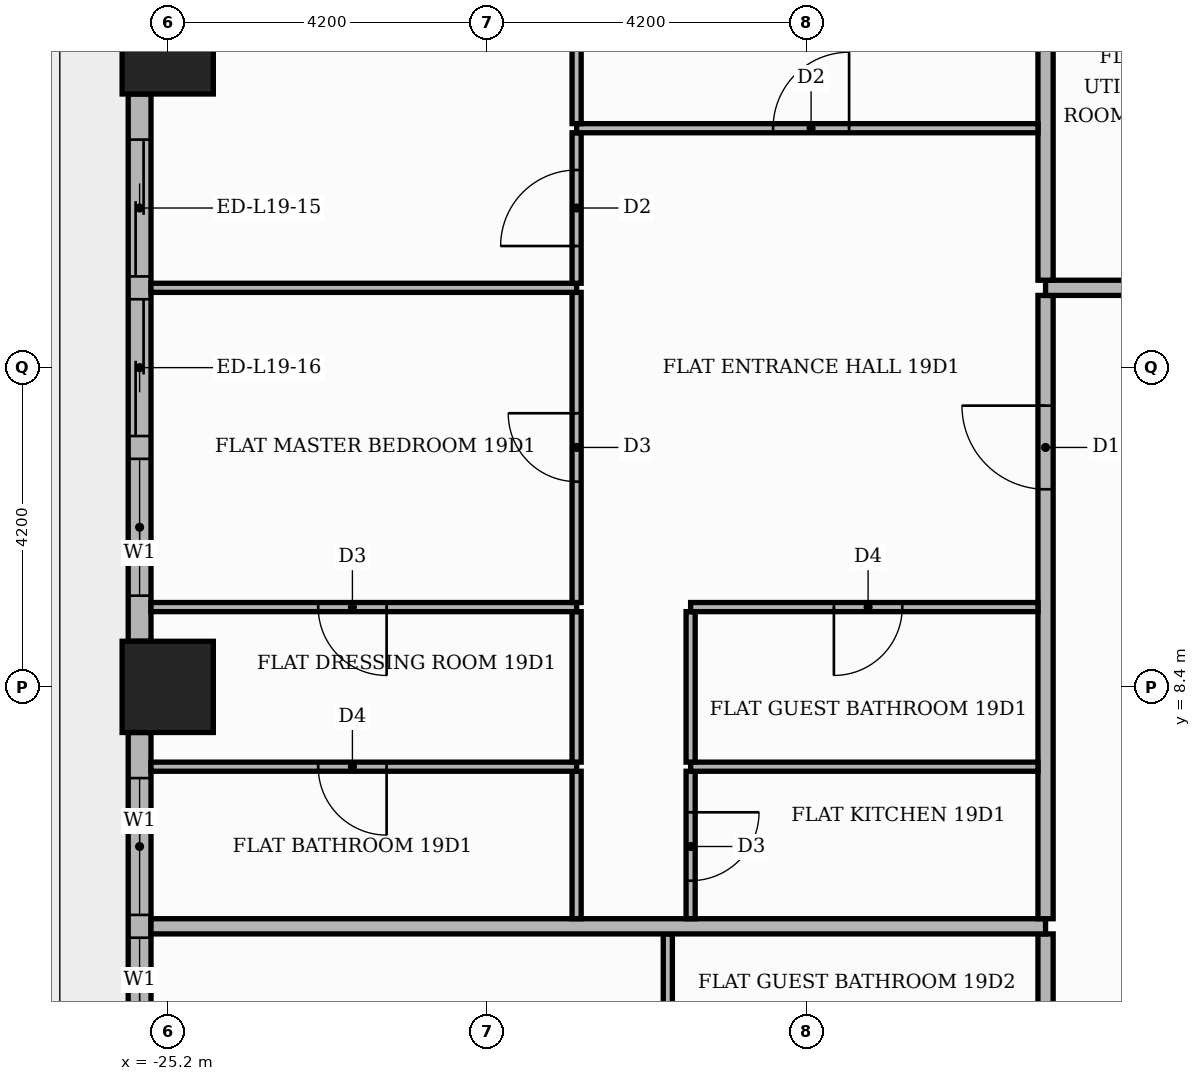
"""IFC4 building model, lengths in metres.
Left out: names, types, materials, properties, quantities, classifications, styles, units other than length and angle.
Written with IfcOpenShell. Run it as: python <this file> out.ifc"""

import sys

from ifc_helpers import new_model, si_unit, direction, frame, frame_2d, origin, origin_2d, place, context, subcontext, project, spatial, rectangle, extrude, element, fill, save


model = new_model("IFC4")
c1 = context("Model", 3, precision=1e-05, world=origin(), true_north=direction((0.0, 1.0)))
c2 = subcontext(c1, "Body", "Model", "MODEL_VIEW")
j1 = project(units=[si_unit("LENGTHUNIT", "METRE"), si_unit("PLANEANGLEUNIT", "RADIAN")], contexts=[c1])
p1 = place(None, origin())
s1 = spatial("IfcSite", under=j1, at=p1, CompositionType="ELEMENT")
p2 = place(p1, origin())
s2 = spatial("IfcBuilding", under=s1, at=p2, CompositionType="ELEMENT")
p3 = place(p2, frame((0.0, 0.0, 83.1)))
s3 = spatial("IfcBuildingStorey", under=s2, at=p3, CompositionType="ELEMENT", Elevation=83.1)
for number, where, z_axis, x_axis in (
    (1, (-25.2, 8.4, 0.0), (0.0, 0.0, 1.0), (1.0, 0.0, 0.0)),
    (2, (-25.2, 16.8, 0.0), (0.0, 0.0, 1.0), (1.0, 0.0, 0.0)),
):
    element("IfcColumn", number, at=place(p3, frame(where, z_axis=z_axis, x_axis=x_axis)), inside=s3, PredefinedType="COLUMN", context=c2, shape_type="SweptSolid", body=[
        extrude(rectangle(XDim=1.2, YDim=1.2, at=origin_2d()), origin(), (0.0, 0.0, 1.0), 3.9),
    ])
p4 = place(p3, frame((-25.57, 16.2, 0.0), z_axis=(0.0, 0.0, 1.0), x_axis=(0.0, -1.0, 0.0)))
e3 = element("IfcWall", 3, at=p4, inside=s3, PredefinedType="STANDARD", context=c2, shape_type="SweptSolid", body=[
    extrude(rectangle(XDim=7.2, YDim=0.3, at=frame_2d((3.6, 0.0))), origin(), (0.0, 0.0, 1.0), 3.48),
])
p5 = place(p4, frame((0.6, 0.0, 0.0)))
e4 = element("IfcOpeningElement", 4, at=p5, cuts=e3, PredefinedType="OPENING", context=c2, shape_type="SweptSolid", body=[
    extrude(rectangle(XDim=1.8, YDim=2.4, at=frame_2d((0.9, 1.2))), frame((0.0, 0.16, 0.0), z_axis=(0.0, -1.0, 0.0), x_axis=(1.0, 0.0, 0.0)), (0.0, 0.0, 1.0), 0.32),
])
p6 = place(p4, frame((2.7, 0.0, 0.0)))
e5 = element("IfcOpeningElement", 5, at=p6, cuts=e3, PredefinedType="OPENING", context=c2, shape_type="SweptSolid", body=[
    extrude(rectangle(XDim=1.8, YDim=2.4, at=frame_2d((0.9, 1.2))), frame((0.0, 0.16, 0.0), z_axis=(0.0, -1.0, 0.0), x_axis=(1.0, 0.0, 0.0)), (0.0, 0.0, 1.0), 0.32),
])
p7 = place(p4, frame((4.8, 0.0, 0.9)))
e6 = element("IfcOpeningElement", 6, at=p7, cuts=e3, PredefinedType="OPENING", context=c2, shape_type="SweptSolid", body=[
    extrude(rectangle(XDim=1.8, YDim=2.1, at=frame_2d((0.9, 1.05))), frame((0.0, 0.16, 0.0), z_axis=(0.0, -1.0, 0.0), x_axis=(1.0, 0.0, 0.0)), (0.0, 0.0, 1.0), 0.32),
])
p8 = place(p3, frame((-25.57, 7.8, 0.0), z_axis=(0.0, 0.0, 1.0), x_axis=(0.0, -1.0, 0.0)))
e7 = element("IfcWall", 7, at=p8, inside=s3, PredefinedType="STANDARD", context=c2, shape_type="SweptSolid", body=[
    extrude(rectangle(XDim=4.65, YDim=0.3, at=frame_2d((2.325, 0.0))), origin(), (0.0, 0.0, 1.0), 3.48),
])
p9 = place(p8, frame((0.6, 0.0, 0.9)))
e8 = element("IfcOpeningElement", 8, at=p9, cuts=e7, PredefinedType="OPENING", context=c2, shape_type="SweptSolid", body=[
    extrude(rectangle(XDim=1.8, YDim=2.1, at=frame_2d((0.9, 1.05))), frame((0.0, 0.16, 0.0), z_axis=(0.0, -1.0, 0.0), x_axis=(1.0, 0.0, 0.0)), (0.0, 0.0, 1.0), 0.32),
])
p10 = place(p8, frame((2.7, 0.0, 0.9)))
e9 = element("IfcOpeningElement", 9, at=p10, cuts=e7, PredefinedType="OPENING", context=c2, shape_type="SweptSolid", body=[
    extrude(rectangle(XDim=1.8, YDim=2.1, at=frame_2d((0.9, 1.05))), frame((0.0, 0.16, 0.0), z_axis=(0.0, -1.0, 0.0), x_axis=(1.0, 0.0, 0.0)), (0.0, 0.0, 1.0), 0.32),
])
p11 = place(p3, frame((-13.65, -13.55, 0.0), z_axis=(0.0, 0.0, 1.0), x_axis=(0.0, 1.0, 0.0)))
e10 = element("IfcWall", 10, at=p11, inside=s3, PredefinedType="PARTITIONING", context=c2, shape_type="SweptSolid", body=[
    extrude(rectangle(XDim=18.7, YDim=0.2, at=frame_2d((9.35, 0.0))), origin(), (0.0, 0.0, 1.0), 3.48),
])
p12 = place(p11, frame((14.05, 0.0, 0.0)))
e11 = element("IfcOpeningElement", 11, at=p12, cuts=e10, PredefinedType="OPENING", context=c2, shape_type="SweptSolid", body=[
    extrude(rectangle(XDim=1.1, YDim=2.4, at=frame_2d((0.55, 1.2))), frame((0.0, 0.11, 0.0), z_axis=(0.0, -1.0, 0.0), x_axis=(1.0, 0.0, 0.0)), (0.0, 0.0, 1.0), 0.22),
])
p13 = place(p3, frame((-18.62, 3.21, 0.0), z_axis=(0.0, 0.0, 1.0), x_axis=(0.0, 1.0, 0.0)))
e12 = element("IfcWall", 12, at=p13, inside=s3, PredefinedType="PARTITIONING", context=c2, shape_type="SweptSolid", body=[
    extrude(rectangle(XDim=1.94, YDim=0.12, at=frame_2d((0.97, 0.0))), origin(), (0.0, 0.0, 1.0), 3.48),
])
p14 = place(p3, frame((-25.42, 5.25, 0.0), z_axis=(0.0, 0.0, 1.0), x_axis=(1.0, 0.0, 0.0)))
e13 = element("IfcWall", 13, at=p14, inside=s3, PredefinedType="PARTITIONING", context=c2, shape_type="SweptSolid", body=[
    extrude(rectangle(XDim=11.77, YDim=0.2, at=frame_2d((5.885, 0.0))), origin(), (0.0, 0.0, 1.0), 3.48),
])
p15 = place(p3, frame((-19.82, 5.35, 0.0), z_axis=(0.0, 0.0, 1.0), x_axis=(0.0, 1.0, 0.0)))
e14 = element("IfcWall", 14, at=p15, inside=s3, PredefinedType="PARTITIONING", context=c2, shape_type="SweptSolid", body=[
    extrude(rectangle(XDim=1.94, YDim=0.12, at=frame_2d((0.97, 0.0))), origin(), (0.0, 0.0, 1.0), 3.48),
])
p16 = place(p3, frame((-18.32, 5.35, 0.0), z_axis=(0.0, 0.0, 1.0), x_axis=(0.0, 1.0, 0.0)))
e15 = element("IfcWall", 15, at=p16, inside=s3, PredefinedType="PARTITIONING", context=c2, shape_type="SweptSolid", body=[
    extrude(rectangle(XDim=1.94, YDim=0.12, at=frame_2d((0.97, 0.0))), origin(), (0.0, 0.0, 1.0), 3.48),
])
p17 = place(p16, frame((0.5, 0.0, 0.0)))
e16 = element("IfcOpeningElement", 16, at=p17, cuts=e15, PredefinedType="OPENING", context=c2, shape_type="SweptSolid", body=[
    extrude(rectangle(XDim=0.9, YDim=2.1, at=frame_2d((0.45, 1.05))), frame((0.0, 0.07, 0.0), z_axis=(0.0, -1.0, 0.0), x_axis=(1.0, 0.0, 0.0)), (0.0, 0.0, 1.0), 0.14),
])
p18 = place(p3, frame((-13.65, 5.35, 0.0), z_axis=(0.0, 0.0, 1.0), x_axis=(0.0, 1.0, 0.0)))
e17 = element("IfcWall", 17, at=p18, inside=s3, PredefinedType="PARTITIONING", context=c2, shape_type="SweptSolid", body=[
    extrude(rectangle(XDim=8.2, YDim=0.2, at=frame_2d((4.1, 0.0))), origin(), (0.0, 0.0, 1.0), 3.48),
])
p19 = place(p18, frame((5.65, 0.0, 0.0)))
e18 = element("IfcOpeningElement", 18, at=p19, cuts=e17, PredefinedType="OPENING", context=c2, shape_type="SweptSolid", body=[
    extrude(rectangle(XDim=1.1, YDim=2.4, at=frame_2d((0.55, 1.2))), frame((0.0, 0.11, 0.0), z_axis=(0.0, -1.0, 0.0), x_axis=(1.0, 0.0, 0.0)), (0.0, 0.0, 1.0), 0.22),
])
p20 = place(p3, frame((-25.42, 7.35, 0.0), z_axis=(0.0, 0.0, 1.0), x_axis=(1.0, 0.0, 0.0)))
e19 = element("IfcWall", 19, at=p20, inside=s3, PredefinedType="PARTITIONING", context=c2, shape_type="SweptSolid", body=[
    extrude(rectangle(XDim=5.6, YDim=0.12, at=frame_2d((2.8, 0.0))), origin(), (0.0, 0.0, 1.0), 3.48),
])
p21 = place(p20, frame((2.2, 0.0, 0.0)))
e20 = element("IfcOpeningElement", 20, at=p21, cuts=e19, PredefinedType="OPENING", context=c2, shape_type="SweptSolid", body=[
    extrude(rectangle(XDim=0.9, YDim=2.1, at=frame_2d((0.45, 1.05))), frame((0.0, 0.07, 0.0), z_axis=(0.0, -1.0, 0.0), x_axis=(1.0, 0.0, 0.0)), (0.0, 0.0, 1.0), 0.14),
])
p22 = place(p3, frame((-18.32, 7.35, 0.0), z_axis=(0.0, 0.0, 1.0), x_axis=(1.0, 0.0, 0.0)))
e21 = element("IfcWall", 21, at=p22, inside=s3, PredefinedType="PARTITIONING", context=c2, shape_type="SweptSolid", body=[
    extrude(rectangle(XDim=4.57, YDim=0.12, at=frame_2d((2.285, 0.0))), origin(), (0.0, 0.0, 1.0), 3.48),
])
for number, where, z_axis, x_axis in (
    (22, (-19.82, 7.41, 0.0), (0.0, 0.0, 1.0), (0.0, 1.0, 0.0)),
    (23, (-18.32, 7.41, 0.0), (0.0, 0.0, 1.0), (0.0, 1.0, 0.0)),
):
    element("IfcWall", number, at=place(p3, frame(where, z_axis=z_axis, x_axis=x_axis)), inside=s3, PredefinedType="PARTITIONING", context=c2, shape_type="SweptSolid", body=[
        extrude(rectangle(XDim=1.98, YDim=0.12, at=frame_2d((0.99, 0.0))), origin(), (0.0, 0.0, 1.0), 3.48),
    ])
p23 = place(p3, frame((-25.42, 9.45, 0.0), z_axis=(0.0, 0.0, 1.0), x_axis=(1.0, 0.0, 0.0)))
e24 = element("IfcWall", 24, at=p23, inside=s3, PredefinedType="PARTITIONING", context=c2, shape_type="SweptSolid", body=[
    extrude(rectangle(XDim=5.6, YDim=0.12, at=frame_2d((2.8, 0.0))), origin(), (0.0, 0.0, 1.0), 3.48),
])
p24 = place(p23, frame((2.2, 0.0, 0.0)))
e25 = element("IfcOpeningElement", 25, at=p24, cuts=e24, PredefinedType="OPENING", context=c2, shape_type="SweptSolid", body=[
    extrude(rectangle(XDim=0.9, YDim=2.1, at=frame_2d((0.45, 1.05))), frame((0.0, 0.07, 0.0), z_axis=(0.0, -1.0, 0.0), x_axis=(1.0, 0.0, 0.0)), (0.0, 0.0, 1.0), 0.14),
])
p25 = place(p3, frame((-18.32, 9.45, 0.0), z_axis=(0.0, 0.0, 1.0), x_axis=(1.0, 0.0, 0.0)))
e26 = element("IfcWall", 26, at=p25, inside=s3, PredefinedType="PARTITIONING", context=c2, shape_type="SweptSolid", body=[
    extrude(rectangle(XDim=4.57, YDim=0.12, at=frame_2d((2.285, 0.0))), origin(), (0.0, 0.0, 1.0), 3.48),
])
p26 = place(p25, frame((1.885, 0.0, 0.0)))
e27 = element("IfcOpeningElement", 27, at=p26, cuts=e26, PredefinedType="OPENING", context=c2, shape_type="SweptSolid", body=[
    extrude(rectangle(XDim=0.9, YDim=2.1, at=frame_2d((0.45, 1.05))), frame((0.0, 0.07, 0.0), z_axis=(0.0, -1.0, 0.0), x_axis=(1.0, 0.0, 0.0)), (0.0, 0.0, 1.0), 0.14),
])
p27 = place(p3, frame((-19.82, 9.51, 0.0), z_axis=(0.0, 0.0, 1.0), x_axis=(0.0, 1.0, 0.0)))
e28 = element("IfcWall", 28, at=p27, inside=s3, PredefinedType="PARTITIONING", context=c2, shape_type="SweptSolid", body=[
    extrude(rectangle(XDim=4.08, YDim=0.12, at=frame_2d((2.04, 0.0))), origin(), (0.0, 0.0, 1.0), 3.48),
])
p28 = place(p27, frame((1.59, 0.0, 0.0)))
e29 = element("IfcOpeningElement", 29, at=p28, cuts=e28, PredefinedType="OPENING", context=c2, shape_type="SweptSolid", body=[
    extrude(rectangle(XDim=0.9, YDim=2.1, at=frame_2d((0.45, 1.05))), frame((0.0, 0.07, 0.0), z_axis=(0.0, -1.0, 0.0), x_axis=(1.0, 0.0, 0.0)), (0.0, 0.0, 1.0), 0.14),
])
p29 = place(p3, frame((-25.42, 13.65, 0.0), z_axis=(0.0, 0.0, 1.0), x_axis=(1.0, 0.0, 0.0)))
e30 = element("IfcWall", 30, at=p29, inside=s3, PredefinedType="PARTITIONING", context=c2, shape_type="SweptSolid", body=[
    extrude(rectangle(XDim=5.6, YDim=0.12, at=frame_2d((2.8, 0.0))), origin(), (0.0, 0.0, 1.0), 3.48),
])
p30 = place(p3, frame((-13.65, 13.65, 0.0), z_axis=(0.0, 0.0, 1.0), x_axis=(1.0, 0.0, 0.0)))
e31 = element("IfcWall", 31, at=p30, inside=s3, PredefinedType="PARTITIONING", context=c2, shape_type="SweptSolid", body=[
    extrude(rectangle(XDim=39.07, YDim=0.2, at=frame_2d((19.535, 0.0))), origin(), (0.0, 0.0, 1.0), 3.48),
])
p31 = place(p30, frame((24.65, 0.0, 0.0)))
e32 = element("IfcOpeningElement", 32, at=p31, cuts=e31, PredefinedType="OPENING", context=c2, shape_type="SweptSolid", body=[
    extrude(rectangle(XDim=1.1, YDim=2.4, at=frame_2d((0.55, 1.2))), frame((0.0, 0.11, 0.0), z_axis=(0.0, -1.0, 0.0), x_axis=(1.0, 0.0, 0.0)), (0.0, 0.0, 1.0), 0.22),
])
p32 = place(p30, frame((16.25, 0.0, 0.0)))
e33 = element("IfcOpeningElement", 33, at=p32, cuts=e31, PredefinedType="OPENING", context=c2, shape_type="SweptSolid", body=[
    extrude(rectangle(XDim=1.1, YDim=2.4, at=frame_2d((0.55, 1.2))), frame((0.0, 0.11, 0.0), z_axis=(0.0, -1.0, 0.0), x_axis=(1.0, 0.0, 0.0)), (0.0, 0.0, 1.0), 0.22),
])
p33 = place(p3, frame((-19.82, 13.71, 0.0), z_axis=(0.0, 0.0, 1.0), x_axis=(0.0, 1.0, 0.0)))
e34 = element("IfcWall", 34, at=p33, inside=s3, PredefinedType="PARTITIONING", context=c2, shape_type="SweptSolid", body=[
    extrude(rectangle(XDim=1.98, YDim=0.12, at=frame_2d((0.99, 0.0))), origin(), (0.0, 0.0, 1.0), 3.48),
])
p34 = place(p33, frame((0.49, 0.0, 0.0)))
e35 = element("IfcOpeningElement", 35, at=p34, cuts=e34, PredefinedType="OPENING", context=c2, shape_type="SweptSolid", body=[
    extrude(rectangle(XDim=1.0, YDim=2.1, at=frame_2d((0.5, 1.05))), frame((0.0, 0.07, 0.0), z_axis=(0.0, -1.0, 0.0), x_axis=(1.0, 0.0, 0.0)), (0.0, 0.0, 1.0), 0.14),
])
p35 = place(p3, frame((-13.65, 13.75, 0.0), z_axis=(0.0, 0.0, 1.0), x_axis=(0.0, 1.0, 0.0)))
e36 = element("IfcWall", 36, at=p35, inside=s3, PredefinedType="PARTITIONING", context=c2, shape_type="SweptSolid", body=[
    extrude(rectangle(XDim=11.67, YDim=0.2, at=frame_2d((5.835, 0.0))), origin(), (0.0, 0.0, 1.0), 3.48),
])
p36 = place(p3, frame((-19.82, 15.75, 0.0), z_axis=(0.0, 0.0, 1.0), x_axis=(1.0, 0.0, 0.0)))
e37 = element("IfcWall", 37, at=p36, inside=s3, PredefinedType="PARTITIONING", context=c2, shape_type="SweptSolid", body=[
    extrude(rectangle(XDim=6.07, YDim=0.12, at=frame_2d((3.035, 0.0))), origin(), (0.0, 0.0, 1.0), 3.48),
])
p37 = place(p36, frame((2.585, 0.0, 0.0)))
e38 = element("IfcOpeningElement", 38, at=p37, cuts=e37, PredefinedType="OPENING", context=c2, shape_type="SweptSolid", body=[
    extrude(rectangle(XDim=1.0, YDim=2.1, at=frame_2d((0.5, 1.05))), frame((0.0, 0.07, 0.0), z_axis=(0.0, -1.0, 0.0), x_axis=(1.0, 0.0, 0.0)), (0.0, 0.0, 1.0), 0.14),
])
p38 = place(p3, frame((-19.82, 15.81, 0.0), z_axis=(0.0, 0.0, 1.0), x_axis=(0.0, 1.0, 0.0)))
e39 = element("IfcWall", 39, at=p38, inside=s3, PredefinedType="PARTITIONING", context=c2, shape_type="SweptSolid", body=[
    extrude(rectangle(XDim=1.59, YDim=0.12, at=frame_2d((0.795, 0.0))), origin(), (0.0, 0.0, 1.0), 3.48),
])
p39 = place(p5, origin())
e40 = element("IfcDoor", 40, at=p39, inside=s3, OperationType="SLIDING_TO_LEFT", PredefinedType="DOOR", context=c2, shape_type="SweptSolid", body=[
    extrude(rectangle(XDim=1.8, YDim=2.4, at=frame_2d((0.9, 1.2))), frame((0.0, 0.025, 0.0), z_axis=(0.0, -1.0, 0.0), x_axis=(1.0, 0.0, 0.0)), (0.0, 0.0, 1.0), 0.05),
])
fill(e4, e40)
p40 = place(p6, origin())
e41 = element("IfcDoor", 41, at=p40, inside=s3, OperationType="SLIDING_TO_RIGHT", PredefinedType="DOOR", context=c2, shape_type="SweptSolid", body=[
    extrude(rectangle(XDim=1.8, YDim=2.4, at=frame_2d((0.9, 1.2))), frame((0.0, 0.025, 0.0), z_axis=(0.0, -1.0, 0.0), x_axis=(1.0, 0.0, 0.0)), (0.0, 0.0, 1.0), 0.05),
])
fill(e5, e41)
p41 = place(p7, origin())
e42 = element("IfcWindow", 42, at=p41, inside=s3, PartitioningType="SINGLE_PANEL", PredefinedType="WINDOW", context=c2, shape_type="SweptSolid", body=[
    extrude(rectangle(XDim=1.8, YDim=2.1, at=frame_2d((0.9, 1.05))), frame((0.0, 0.03, 0.0), z_axis=(0.0, -1.0, 0.0), x_axis=(1.0, 0.0, 0.0)), (0.0, 0.0, 1.0), 0.06),
])
fill(e6, e42)
p42 = place(p9, origin())
e43 = element("IfcWindow", 43, at=p42, inside=s3, PartitioningType="SINGLE_PANEL", PredefinedType="WINDOW", context=c2, shape_type="SweptSolid", body=[
    extrude(rectangle(XDim=1.8, YDim=2.1, at=frame_2d((0.9, 1.05))), frame((0.0, 0.03, 0.0), z_axis=(0.0, -1.0, 0.0), x_axis=(1.0, 0.0, 0.0)), (0.0, 0.0, 1.0), 0.06),
])
fill(e8, e43)
p43 = place(p10, origin())
e44 = element("IfcWindow", 44, at=p43, inside=s3, PartitioningType="SINGLE_PANEL", PredefinedType="WINDOW", context=c2, shape_type="SweptSolid", body=[
    extrude(rectangle(XDim=1.8, YDim=2.1, at=frame_2d((0.9, 1.05))), frame((0.0, 0.03, 0.0), z_axis=(0.0, -1.0, 0.0), x_axis=(1.0, 0.0, 0.0)), (0.0, 0.0, 1.0), 0.06),
])
fill(e9, e44)
p44 = place(p19, origin())
e45 = element("IfcDoor", 45, at=p44, inside=s3, OperationType="SINGLE_SWING_RIGHT", PredefinedType="DOOR", context=c2, shape_type="SweptSolid", body=[
    extrude(rectangle(XDim=1.1, YDim=2.4, at=frame_2d((0.55, 1.2))), frame((0.0, 0.025, 0.0), z_axis=(0.0, -1.0, 0.0), x_axis=(1.0, 0.0, 0.0)), (0.0, 0.0, 1.0), 0.05),
])
fill(e18, e45)
p45 = place(p37, origin())
e46 = element("IfcDoor", 46, at=p45, inside=s3, OperationType="SINGLE_SWING_RIGHT", PredefinedType="DOOR", context=c2, shape_type="SweptSolid", body=[
    extrude(rectangle(XDim=1.0, YDim=2.1, at=frame_2d((0.5, 1.05))), frame((0.0, 0.025, 0.0), z_axis=(0.0, -1.0, 0.0), x_axis=(1.0, 0.0, 0.0)), (0.0, 0.0, 1.0), 0.05),
])
fill(e38, e46)
p46 = place(p26, frame((0.9, 0.0, 0.0), z_axis=(0.0, 0.0, 1.0), x_axis=(-1.0, 0.0, 0.0)))
e47 = element("IfcDoor", 47, at=p46, inside=s3, OperationType="SINGLE_SWING_LEFT", PredefinedType="DOOR", context=c2, shape_type="SweptSolid", body=[
    extrude(rectangle(XDim=0.9, YDim=2.1, at=frame_2d((0.45, 1.05))), frame((0.0, 0.025, 0.0), z_axis=(0.0, -1.0, 0.0), x_axis=(1.0, 0.0, 0.0)), (0.0, 0.0, 1.0), 0.05),
])
fill(e27, e47)
p47 = place(p17, frame((0.9, 0.0, 0.0), z_axis=(0.0, 0.0, 1.0), x_axis=(-1.0, 0.0, 0.0)))
e48 = element("IfcDoor", 48, at=p47, inside=s3, OperationType="SINGLE_SWING_RIGHT", PredefinedType="DOOR", context=c2, shape_type="SweptSolid", body=[
    extrude(rectangle(XDim=0.9, YDim=2.1, at=frame_2d((0.45, 1.05))), frame((0.0, 0.025, 0.0), z_axis=(0.0, -1.0, 0.0), x_axis=(1.0, 0.0, 0.0)), (0.0, 0.0, 1.0), 0.05),
])
fill(e16, e48)
p48 = place(p34, origin())
e49 = element("IfcDoor", 49, at=p48, inside=s3, OperationType="SINGLE_SWING_LEFT", PredefinedType="DOOR", context=c2, shape_type="SweptSolid", body=[
    extrude(rectangle(XDim=1.0, YDim=2.1, at=frame_2d((0.5, 1.05))), frame((0.0, 0.025, 0.0), z_axis=(0.0, -1.0, 0.0), x_axis=(1.0, 0.0, 0.0)), (0.0, 0.0, 1.0), 0.05),
])
fill(e35, e49)
p49 = place(p28, origin())
e50 = element("IfcDoor", 50, at=p49, inside=s3, OperationType="SINGLE_SWING_RIGHT", PredefinedType="DOOR", context=c2, shape_type="SweptSolid", body=[
    extrude(rectangle(XDim=0.9, YDim=2.1, at=frame_2d((0.45, 1.05))), frame((0.0, 0.025, 0.0), z_axis=(0.0, -1.0, 0.0), x_axis=(1.0, 0.0, 0.0)), (0.0, 0.0, 1.0), 0.05),
])
fill(e29, e50)
p50 = place(p24, frame((0.9, 0.0, 0.0), z_axis=(0.0, 0.0, 1.0), x_axis=(-1.0, 0.0, 0.0)))
e51 = element("IfcDoor", 51, at=p50, inside=s3, OperationType="SINGLE_SWING_RIGHT", PredefinedType="DOOR", context=c2, shape_type="SweptSolid", body=[
    extrude(rectangle(XDim=0.9, YDim=2.1, at=frame_2d((0.45, 1.05))), frame((0.0, 0.025, 0.0), z_axis=(0.0, -1.0, 0.0), x_axis=(1.0, 0.0, 0.0)), (0.0, 0.0, 1.0), 0.05),
])
fill(e25, e51)
p51 = place(p21, frame((0.9, 0.0, 0.0), z_axis=(0.0, 0.0, 1.0), x_axis=(-1.0, 0.0, 0.0)))
e52 = element("IfcDoor", 52, at=p51, inside=s3, OperationType="SINGLE_SWING_RIGHT", PredefinedType="DOOR", context=c2, shape_type="SweptSolid", body=[
    extrude(rectangle(XDim=0.9, YDim=2.1, at=frame_2d((0.45, 1.05))), frame((0.0, 0.025, 0.0), z_axis=(0.0, -1.0, 0.0), x_axis=(1.0, 0.0, 0.0)), (0.0, 0.0, 1.0), 0.05),
])
fill(e20, e52)
save(model, sys.argv[1])
